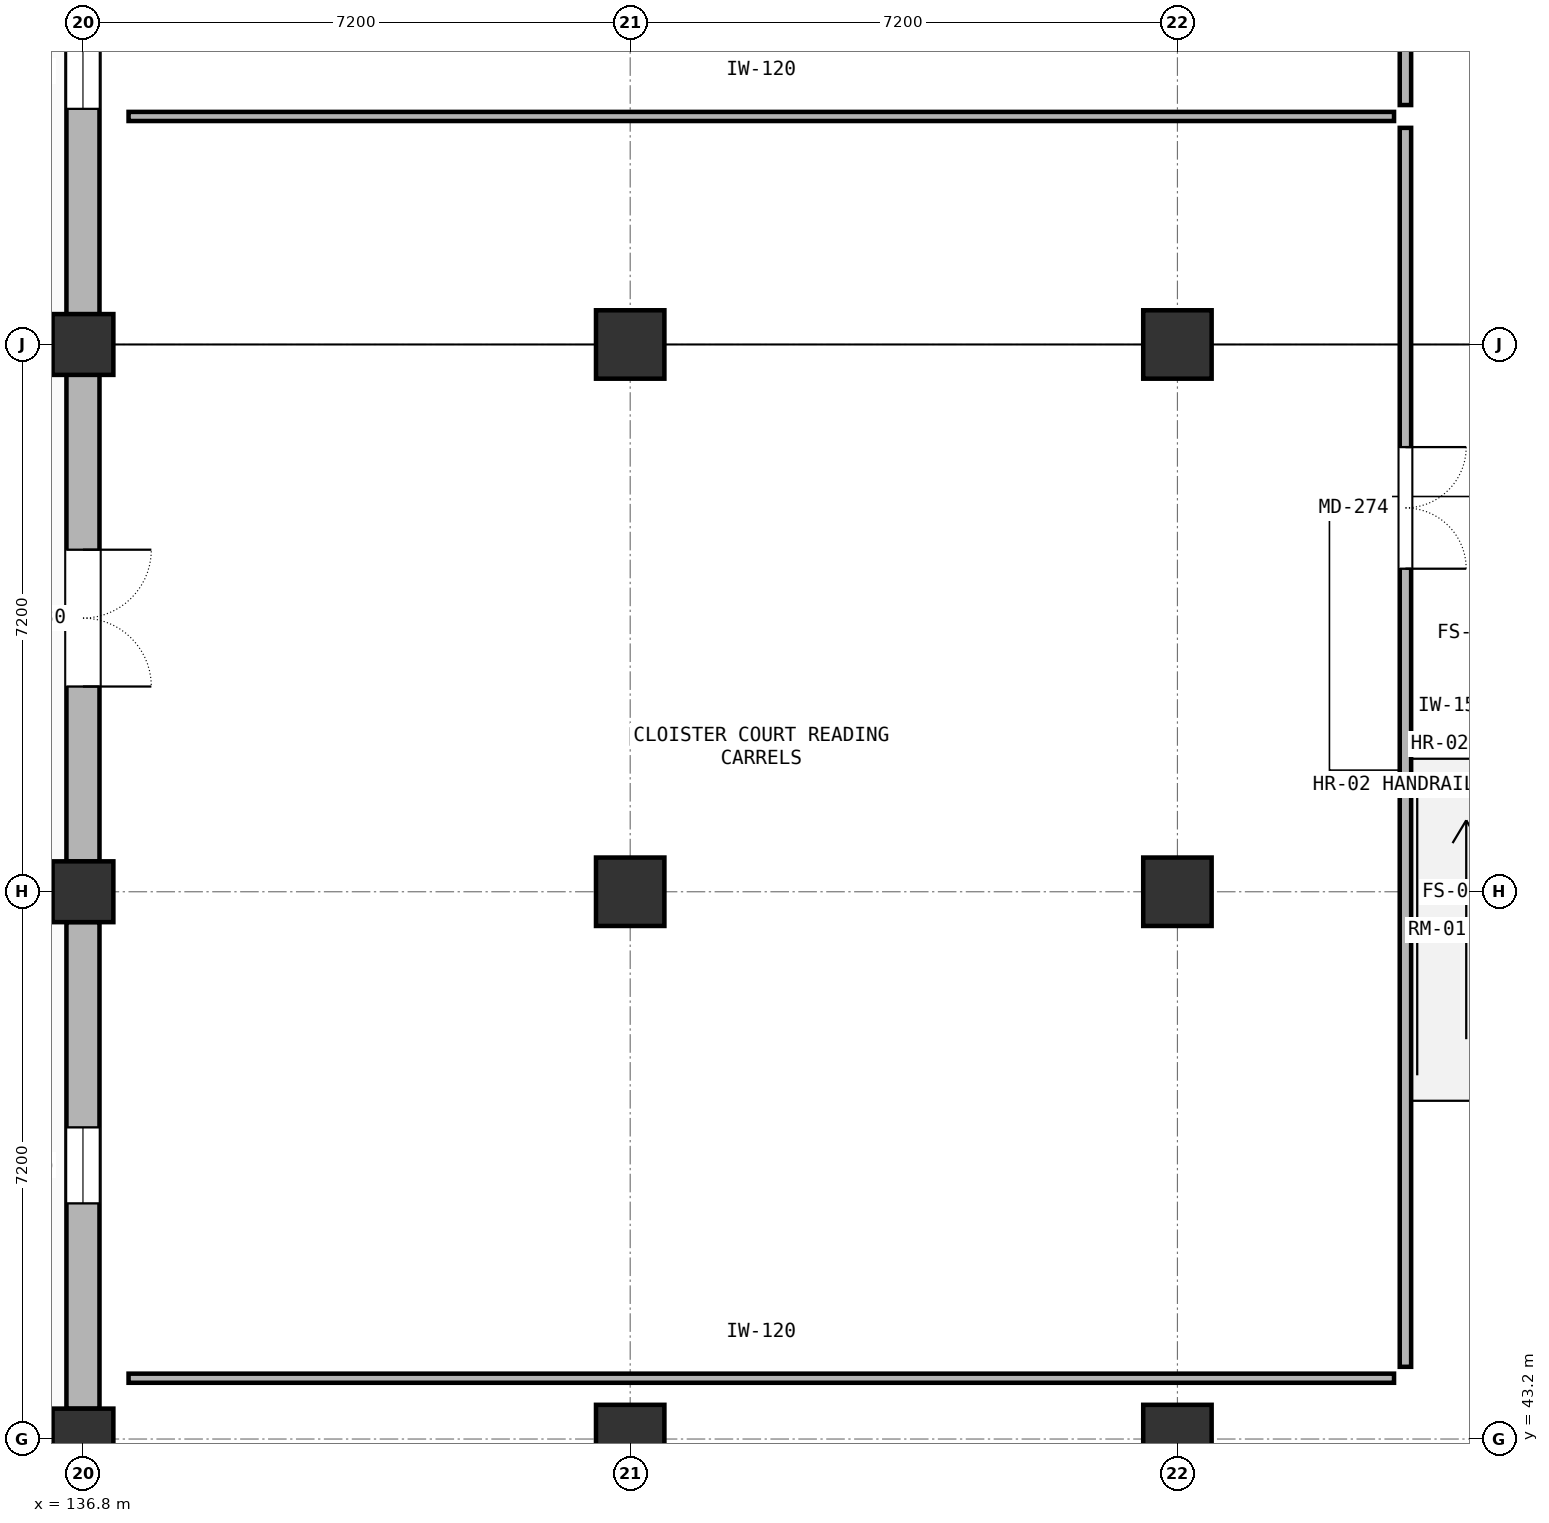
"""IFC4 building model, lengths in metres.
Left out: names, types, materials, properties, quantities, classifications, styles, units other than length and angle.
Written with IfcOpenShell. Run it as: python <this file> out.ifc"""

import sys

from ifc_helpers import new_model, si_unit, direction, frame, frame_2d, origin, origin_2d, place, context, subcontext, project, spatial, rectangle, extrude, element, fill, save


model = new_model("IFC4")
c1 = context("Model", 3, precision=1e-05, world=origin(), true_north=direction((0.0, 1.0)))
c2 = subcontext(c1, "Body", "Model", "MODEL_VIEW")
j1 = project(units=[si_unit("LENGTHUNIT", "METRE"), si_unit("PLANEANGLEUNIT", "RADIAN")], contexts=[c1])
p1 = place(None, origin())
s1 = spatial("IfcSite", under=j1, at=p1, CompositionType="ELEMENT")
p2 = place(p1, origin())
s2 = spatial("IfcBuilding", under=s1, at=p2, CompositionType="ELEMENT")
p3 = place(p2, origin())
s3 = spatial("IfcBuildingStorey", under=s2, at=p3, CompositionType="ELEMENT", Elevation=0.0)
for number, where, z_axis, x_axis in (
    (1, (136.8, 43.2, 0.0), (0.0, 0.0, 1.0), (1.0, 0.0, 0.0)),
    (2, (136.8, 50.4, 0.0), (0.0, 0.0, 1.0), (1.0, 0.0, 0.0)),
    (3, (136.8, 57.6, 0.0), (0.0, 0.0, 1.0), (1.0, 0.0, 0.0)),
):
    element("IfcColumn", number, at=place(p3, frame(where, z_axis=z_axis, x_axis=x_axis)), inside=s3, PredefinedType="COLUMN", context=c2, shape_type="SweptSolid", body=[
        extrude(rectangle(XDim=0.8, YDim=0.8, at=origin_2d()), origin(), (0.0, 0.0, 1.0), 5.4),
    ])
for number, where, z_axis, x_axis in (
    (4, (144.0, 43.2, 0.0), (0.0, 0.0, 1.0), (1.0, 0.0, 0.0)),
    (5, (144.0, 50.4, 0.0), (0.0, 0.0, 1.0), (1.0, 0.0, 0.0)),
    (6, (144.0, 57.6, 0.0), (0.0, 0.0, 1.0), (1.0, 0.0, 0.0)),
    (7, (151.2, 43.2, 0.0), (0.0, 0.0, 1.0), (1.0, 0.0, 0.0)),
    (8, (151.2, 50.4, 0.0), (0.0, 0.0, 1.0), (1.0, 0.0, 0.0)),
    (9, (151.2, 57.6, 0.0), (0.0, 0.0, 1.0), (1.0, 0.0, 0.0)),
):
    element("IfcColumn", number, at=place(p3, frame(where, z_axis=z_axis, x_axis=x_axis)), inside=s3, PredefinedType="COLUMN", context=c2, shape_type="SweptSolid", body=[
        extrude(rectangle(XDim=0.9, YDim=0.9, at=origin_2d()), origin(), (0.0, 0.0, 1.0), 5.4),
    ])
p4 = place(p3, frame((136.8, 43.598, 0.0), z_axis=(0.0, 0.0, 1.0), x_axis=(0.0, 1.0, 0.0)))
e10 = element("IfcWall", 10, at=p4, inside=s3, PredefinedType="SOLIDWALL", context=c2, shape_type="SweptSolid", body=[
    extrude(rectangle(XDim=6.404, YDim=0.435, at=frame_2d((3.202, 0.0))), origin(), (0.0, 0.0, 1.0), 4.1),
])
p5 = place(p4, frame((2.702, 0.0, 0.7)))
e11 = element("IfcOpeningElement", 11, at=p5, cuts=e10, PredefinedType="OPENING", context=c2, shape_type="SweptSolid", body=[
    extrude(rectangle(XDim=1.0, YDim=2.0, at=frame_2d((0.5, 1.0))), frame((0.0, 0.228, 0.0), z_axis=(0.0, -1.0, 0.0), x_axis=(1.0, 0.0, 0.0)), (0.0, 0.0, 1.0), 0.455),
])
p6 = place(p3, frame((136.8, 50.798, 0.0), z_axis=(0.0, 0.0, 1.0), x_axis=(0.0, 1.0, 0.0)))
e12 = element("IfcWall", 12, at=p6, inside=s3, PredefinedType="SOLIDWALL", context=c2, shape_type="SweptSolid", body=[
    extrude(rectangle(XDim=6.404, YDim=0.435, at=frame_2d((3.202, 0.0))), origin(), (0.0, 0.0, 1.0), 4.1),
])
p7 = place(p6, frame((2.302, 0.0, 0.0)))
e13 = element("IfcOpeningElement", 13, at=p7, cuts=e12, PredefinedType="OPENING", context=c2, shape_type="SweptSolid", body=[
    extrude(rectangle(XDim=1.8, YDim=2.35, at=frame_2d((0.9, 1.175))), frame((0.0, 0.228, 0.0), z_axis=(0.0, -1.0, 0.0), x_axis=(1.0, 0.0, 0.0)), (0.0, 0.0, 1.0), 0.455),
])
p8 = place(p3, frame((136.8, 57.998, 0.0), z_axis=(0.0, 0.0, 1.0), x_axis=(0.0, 1.0, 0.0)))
e14 = element("IfcWall", 14, at=p8, inside=s3, PredefinedType="SOLIDWALL", context=c2, shape_type="SweptSolid", body=[
    extrude(rectangle(XDim=6.404, YDim=0.435, at=frame_2d((3.202, 0.0))), origin(), (0.0, 0.0, 1.0), 4.1),
])
p9 = place(p8, frame((2.702, 0.0, 0.7)))
e15 = element("IfcOpeningElement", 15, at=p9, cuts=e14, PredefinedType="OPENING", context=c2, shape_type="SweptSolid", body=[
    extrude(rectangle(XDim=1.0, YDim=2.0, at=frame_2d((0.5, 1.0))), frame((0.0, 0.228, 0.0), z_axis=(0.0, -1.0, 0.0), x_axis=(1.0, 0.0, 0.0)), (0.0, 0.0, 1.0), 0.455),
])
p10 = place(p3, frame((154.2, 60.45, 0.0), z_axis=(0.0, 0.0, 1.0), x_axis=(0.0, -1.0, 0.0)))
e16 = element("IfcWall", 16, at=p10, inside=s3, PredefinedType="PARTITIONING", context=c2, shape_type="SweptSolid", body=[
    extrude(rectangle(XDim=16.3, YDim=0.15, at=frame_2d((8.15, 0.0))), origin(), (0.0, 0.0, 1.0), 4.12),
])
p11 = place(p10, frame((4.2, 0.0, 0.0)))
e17 = element("IfcOpeningElement", 17, at=p11, cuts=e16, PredefinedType="OPENING", context=c2, shape_type="SweptSolid", body=[
    extrude(rectangle(XDim=1.6, YDim=2.2, at=frame_2d((0.8, 1.1))), frame((0.0, 0.085, 0.0), z_axis=(0.0, -1.0, 0.0), x_axis=(1.0, 0.0, 0.0)), (0.0, 0.0, 1.0), 0.17),
])
p12 = place(p3, frame((137.4, 44.0, 0.0), z_axis=(0.0, 0.0, 1.0), x_axis=(1.0, 0.0, 0.0)))
e18 = element("IfcWall", 18, at=p12, inside=s3, PredefinedType="PARTITIONING", context=c2, shape_type="SweptSolid", body=[
    extrude(rectangle(XDim=16.65, YDim=0.12, at=frame_2d((8.325, 0.0))), origin(), (0.0, 0.0, 1.0), 4.12),
])
p13 = place(p3, frame((154.2, 78.25, 0.0), z_axis=(0.0, 0.0, 1.0), x_axis=(0.0, -1.0, 0.0)))
e19 = element("IfcWall", 19, at=p13, inside=s3, PredefinedType="PARTITIONING", context=c2, shape_type="SweptSolid", body=[
    extrude(rectangle(XDim=17.5, YDim=0.15, at=frame_2d((8.75, 0.0))), origin(), (0.0, 0.0, 1.0), 4.12),
])
p14 = place(p13, frame((4.2, 0.0, 0.0)))
e20 = element("IfcOpeningElement", 20, at=p14, cuts=e19, PredefinedType="OPENING", context=c2, shape_type="SweptSolid", body=[
    extrude(rectangle(XDim=1.6, YDim=2.2, at=frame_2d((0.8, 1.1))), frame((0.0, 0.085, 0.0), z_axis=(0.0, -1.0, 0.0), x_axis=(1.0, 0.0, 0.0)), (0.0, 0.0, 1.0), 0.17),
])
p15 = place(p3, frame((137.4, 60.6, 0.0), z_axis=(0.0, 0.0, 1.0), x_axis=(1.0, 0.0, 0.0)))
e21 = element("IfcWall", 21, at=p15, inside=s3, PredefinedType="PARTITIONING", context=c2, shape_type="SweptSolid", body=[
    extrude(rectangle(XDim=16.65, YDim=0.12, at=frame_2d((8.325, 0.0))), origin(), (0.0, 0.0, 1.0), 4.12),
])
p16 = place(p5, origin())
e22 = element("IfcWindow", 22, at=p16, inside=s3, PartitioningType="SINGLE_PANEL", PredefinedType="WINDOW", context=c2, shape_type="SweptSolid", body=[
    extrude(rectangle(XDim=1.0, YDim=2.0, at=frame_2d((0.5, 1.0))), frame((0.0, 0.03, 0.0), z_axis=(0.0, -1.0, 0.0), x_axis=(1.0, 0.0, 0.0)), (0.0, 0.0, 1.0), 0.06),
])
fill(e11, e22)
p17 = place(p7, frame((1.8, 0.0, 0.0), z_axis=(0.0, 0.0, 1.0), x_axis=(-1.0, 0.0, 0.0)))
e23 = element("IfcDoor", 23, at=p17, inside=s3, OperationType="DOUBLE_DOOR_SINGLE_SWING", PredefinedType="DOOR", context=c2, shape_type="SweptSolid", body=[
    extrude(rectangle(XDim=1.8, YDim=2.35, at=frame_2d((0.9, 1.175))), frame((0.0, 0.025, 0.0), z_axis=(0.0, -1.0, 0.0), x_axis=(1.0, 0.0, 0.0)), (0.0, 0.0, 1.0), 0.05),
])
fill(e13, e23)
p18 = place(p9, origin())
e24 = element("IfcWindow", 24, at=p18, inside=s3, PartitioningType="SINGLE_PANEL", PredefinedType="WINDOW", context=c2, shape_type="SweptSolid", body=[
    extrude(rectangle(XDim=1.0, YDim=2.0, at=frame_2d((0.5, 1.0))), frame((0.0, 0.03, 0.0), z_axis=(0.0, -1.0, 0.0), x_axis=(1.0, 0.0, 0.0)), (0.0, 0.0, 1.0), 0.06),
])
fill(e15, e24)
p19 = place(p11, origin())
e25 = element("IfcDoor", 25, at=p19, inside=s3, OperationType="DOUBLE_DOOR_SINGLE_SWING", PredefinedType="DOOR", context=c2, shape_type="SweptSolid", body=[
    extrude(rectangle(XDim=1.6, YDim=2.2, at=frame_2d((0.8, 1.1))), frame((0.0, 0.025, 0.0), z_axis=(0.0, -1.0, 0.0), x_axis=(1.0, 0.0, 0.0)), (0.0, 0.0, 1.0), 0.05),
])
fill(e17, e25)
save(model, sys.argv[1])
